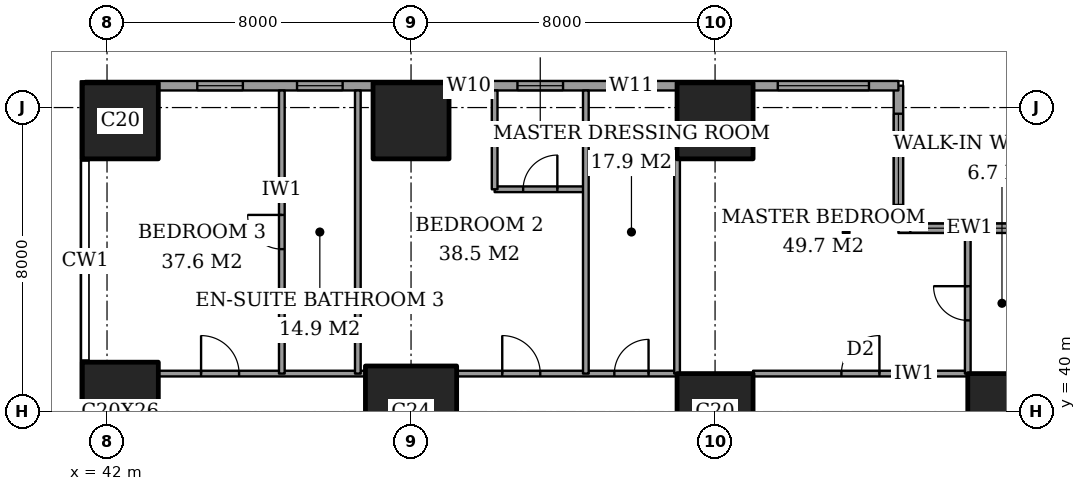
"""IFC4 building model, lengths in metres.
Left out: names, types, materials, properties, quantities, classifications, styles, units other than length and angle.
Written with IfcOpenShell. Run it as: python <this file> out.ifc"""

import sys

from ifc_helpers import new_model, si_unit, direction, frame, frame_2d, origin, origin_2d, place, context, subcontext, project, spatial, rectangle, extrude, element, fill, save


model = new_model("IFC4")
c1 = context("Model", 3, precision=1e-05, world=origin(), true_north=direction((0.0, 1.0)))
c2 = subcontext(c1, "Body", "Model", "MODEL_VIEW")
j1 = project(units=[si_unit("LENGTHUNIT", "METRE"), si_unit("PLANEANGLEUNIT", "RADIAN")], contexts=[c1])
p1 = place(None, origin())
s1 = spatial("IfcSite", under=j1, at=p1, CompositionType="ELEMENT")
p2 = place(p1, origin())
s2 = spatial("IfcBuilding", under=s1, at=p2, CompositionType="ELEMENT")
p3 = place(p2, frame((0.0, 0.0, 114.2)))
s3 = spatial("IfcBuildingStorey", under=s2, at=p3, CompositionType="ELEMENT", Elevation=114.2)
p4 = place(p3, frame((42.35, 40.0, 0.0), z_axis=(0.0, 0.0, 1.0), x_axis=(1.0, 0.0, 0.0)))
e1 = element("IfcColumn", 1, at=p4, inside=s3, PredefinedType="COLUMN", context=c2, shape_type="SweptSolid", body=[
    extrude(rectangle(XDim=2.0, YDim=2.6, at=origin_2d()), origin(), (0.0, 0.0, 1.0), 3.6),
])
p5 = place(p3, frame((42.35, 47.65, 0.0), z_axis=(0.0, 0.0, 1.0), x_axis=(1.0, 0.0, 0.0)))
e2 = element("IfcColumn", 2, at=p5, inside=s3, PredefinedType="COLUMN", context=c2, shape_type="SweptSolid", body=[
    extrude(rectangle(XDim=2.0, YDim=2.0, at=origin_2d()), origin(), (0.0, 0.0, 1.0), 3.6),
])
p6 = place(p3, frame((50.0, 40.0, 0.0), z_axis=(0.0, 0.0, 1.0), x_axis=(1.0, 0.0, 0.0)))
e3 = element("IfcColumn", 3, at=p6, inside=s3, PredefinedType="COLUMN", context=c2, shape_type="SweptSolid", body=[
    extrude(rectangle(XDim=2.4, YDim=2.4, at=origin_2d()), origin(), (0.0, 0.0, 1.0), 3.6),
])
for number, where, z_axis, x_axis in (
    (4, (50.0, 47.65, 0.0), (0.0, 0.0, 1.0), (1.0, 0.0, 0.0)),
    (5, (58.0, 40.0, 0.0), (0.0, 0.0, 1.0), (1.0, 0.0, 0.0)),
    (6, (58.0, 47.65, 0.0), (0.0, 0.0, 1.0), (1.0, 0.0, 0.0)),
    (7, (65.65, 40.0, 0.0), (0.0, 0.0, 1.0), (1.0, 0.0, 0.0)),
):
    element("IfcColumn", number, at=place(p3, frame(where, z_axis=z_axis, x_axis=x_axis)), inside=s3, PredefinedType="COLUMN", context=c2, shape_type="SweptSolid", body=[
        extrude(rectangle(XDim=2.0, YDim=2.0, at=origin_2d()), origin(), (0.0, 0.0, 1.0), 3.6),
    ])
p7 = place(p3, frame((66.575, 44.825, 0.0), z_axis=(0.0, 0.0, 1.0), x_axis=(-1.0, 0.0, 0.0)))
e8 = element("IfcWall", 8, at=p7, inside=s3, PredefinedType="SOLIDWALL", context=c2, shape_type="SweptSolid", body=[
    extrude(rectangle(XDim=3.75, YDim=0.25, at=frame_2d((1.875, 0.0))), origin(), (0.0, 0.0, 1.0), 3.6),
])
p8 = place(p7, frame((0.5, 0.0, 0.4)))
e9 = element("IfcOpeningElement", 9, at=p8, cuts=e8, PredefinedType="OPENING", context=c2, shape_type="SweptSolid", body=[
    extrude(rectangle(XDim=1.2, YDim=2.2, at=frame_2d((0.6, 1.1))), frame((0.0, 0.135, 0.0), z_axis=(0.0, -1.0, 0.0), x_axis=(1.0, 0.0, 0.0)), (0.0, 0.0, 1.0), 0.27),
])
p9 = place(p7, frame((2.238, 0.0, 0.4)))
e10 = element("IfcOpeningElement", 10, at=p9, cuts=e8, PredefinedType="OPENING", context=c2, shape_type="SweptSolid", body=[
    extrude(rectangle(XDim=1.2, YDim=2.2, at=frame_2d((0.6, 1.1))), frame((0.0, 0.135, 0.0), z_axis=(0.0, -1.0, 0.0), x_axis=(1.0, 0.0, 0.0)), (0.0, 0.0, 1.0), 0.27),
])
p10 = place(p3, frame((62.825, 44.825, 0.0), z_axis=(0.0, 0.0, 1.0), x_axis=(0.0, 1.0, 0.0)))
e11 = element("IfcWall", 11, at=p10, inside=s3, PredefinedType="SOLIDWALL", context=c2, shape_type="SweptSolid", body=[
    extrude(rectangle(XDim=3.75, YDim=0.25, at=frame_2d((1.875, 0.0))), origin(), (0.0, 0.0, 1.0), 3.6),
])
p11 = place(p10, frame((0.613, 0.0, 0.4)))
e12 = element("IfcOpeningElement", 12, at=p11, cuts=e11, PredefinedType="OPENING", context=c2, shape_type="SweptSolid", body=[
    extrude(rectangle(XDim=2.4, YDim=2.2, at=frame_2d((1.2, 1.1))), frame((0.0, 0.135, 0.0), z_axis=(0.0, -1.0, 0.0), x_axis=(1.0, 0.0, 0.0)), (0.0, 0.0, 1.0), 0.27),
])
p12 = place(p3, frame((62.825, 48.575, 0.0), z_axis=(0.0, 0.0, 1.0), x_axis=(-1.0, 0.0, 0.0)))
e13 = element("IfcWall", 13, at=p12, inside=s3, PredefinedType="SOLIDWALL", context=c2, shape_type="SweptSolid", body=[
    extrude(rectangle(XDim=21.4, YDim=0.25, at=frame_2d((10.7, 0.0))), origin(), (0.0, 0.0, 1.0), 3.6),
])
p13 = place(p12, frame((0.775, 0.0, 0.4)))
e14 = element("IfcOpeningElement", 14, at=p13, cuts=e13, PredefinedType="OPENING", context=c2, shape_type="SweptSolid", body=[
    extrude(rectangle(XDim=2.4, YDim=2.2, at=frame_2d((1.2, 1.1))), frame((0.0, 0.135, 0.0), z_axis=(0.0, -1.0, 0.0), x_axis=(1.0, 0.0, 0.0)), (0.0, 0.0, 1.0), 0.27),
])
p14 = place(p12, frame((6.425, 0.0, 0.4)))
e15 = element("IfcOpeningElement", 15, at=p14, cuts=e13, PredefinedType="OPENING", context=c2, shape_type="SweptSolid", body=[
    extrude(rectangle(XDim=1.2, YDim=2.2, at=frame_2d((0.6, 1.1))), frame((0.0, 0.135, 0.0), z_axis=(0.0, -1.0, 0.0), x_axis=(1.0, 0.0, 0.0)), (0.0, 0.0, 1.0), 0.27),
])
p15 = place(p12, frame((8.825, 0.0, 0.4)))
e16 = element("IfcOpeningElement", 16, at=p15, cuts=e13, PredefinedType="OPENING", context=c2, shape_type="SweptSolid", body=[
    extrude(rectangle(XDim=1.2, YDim=2.2, at=frame_2d((0.6, 1.1))), frame((0.0, 0.135, 0.0), z_axis=(0.0, -1.0, 0.0), x_axis=(1.0, 0.0, 0.0)), (0.0, 0.0, 1.0), 0.27),
])
p16 = place(p12, frame((11.0, 0.0, 0.4)))
e17 = element("IfcOpeningElement", 17, at=p16, cuts=e13, PredefinedType="OPENING", context=c2, shape_type="SweptSolid", body=[
    extrude(rectangle(XDim=0.6, YDim=2.2, at=frame_2d((0.3, 1.1))), frame((0.0, 0.135, 0.0), z_axis=(0.0, -1.0, 0.0), x_axis=(1.0, 0.0, 0.0)), (0.0, 0.0, 1.0), 0.27),
])
p17 = place(p12, frame((14.625, 0.0, 0.4)))
e18 = element("IfcOpeningElement", 18, at=p17, cuts=e13, PredefinedType="OPENING", context=c2, shape_type="SweptSolid", body=[
    extrude(rectangle(XDim=1.2, YDim=2.2, at=frame_2d((0.6, 1.1))), frame((0.0, 0.135, 0.0), z_axis=(0.0, -1.0, 0.0), x_axis=(1.0, 0.0, 0.0)), (0.0, 0.0, 1.0), 0.27),
])
p18 = place(p12, frame((17.25, 0.0, 0.4)))
e19 = element("IfcOpeningElement", 19, at=p18, cuts=e13, PredefinedType="OPENING", context=c2, shape_type="SweptSolid", body=[
    extrude(rectangle(XDim=1.2, YDim=2.2, at=frame_2d((0.6, 1.1))), frame((0.0, 0.135, 0.0), z_axis=(0.0, -1.0, 0.0), x_axis=(1.0, 0.0, 0.0)), (0.0, 0.0, 1.0), 0.27),
])
p19 = place(p3, frame((43.35, 41.0, 0.0), z_axis=(0.0, 0.0, 1.0), x_axis=(1.0, 0.0, 0.0)))
e20 = element("IfcWall", 20, at=p19, inside=s3, PredefinedType="PARTITIONING", context=c2, shape_type="SweptSolid", body=[
    extrude(rectangle(XDim=5.45, YDim=0.15, at=frame_2d((2.725, 0.0))), origin(), (0.0, 0.0, 1.0), 3.35),
])
p20 = place(p19, frame((1.125, 0.0, 0.0)))
e21 = element("IfcOpeningElement", 21, at=p20, cuts=e20, PredefinedType="OPENING", context=c2, shape_type="SweptSolid", body=[
    extrude(rectangle(XDim=1.0, YDim=2.1, at=frame_2d((0.5, 1.05))), frame((0.0, 0.085, 0.0), z_axis=(0.0, -1.0, 0.0), x_axis=(1.0, 0.0, 0.0)), (0.0, 0.0, 1.0), 0.17),
])
p21 = place(p3, frame((51.2, 41.0, 0.0), z_axis=(0.0, 0.0, 1.0), x_axis=(1.0, 0.0, 0.0)))
e22 = element("IfcWall", 22, at=p21, inside=s3, PredefinedType="PARTITIONING", context=c2, shape_type="SweptSolid", body=[
    extrude(rectangle(XDim=5.8, YDim=0.15, at=frame_2d((2.9, 0.0))), origin(), (0.0, 0.0, 1.0), 3.35),
])
p22 = place(p21, frame((4.15, 0.0, 0.0)))
e23 = element("IfcOpeningElement", 23, at=p22, cuts=e22, PredefinedType="OPENING", context=c2, shape_type="SweptSolid", body=[
    extrude(rectangle(XDim=0.9, YDim=2.1, at=frame_2d((0.45, 1.05))), frame((0.0, 0.085, 0.0), z_axis=(0.0, -1.0, 0.0), x_axis=(1.0, 0.0, 0.0)), (0.0, 0.0, 1.0), 0.17),
])
p23 = place(p21, frame((1.2, 0.0, 0.0)))
e24 = element("IfcOpeningElement", 24, at=p23, cuts=e22, PredefinedType="OPENING", context=c2, shape_type="SweptSolid", body=[
    extrude(rectangle(XDim=1.0, YDim=2.1, at=frame_2d((0.5, 1.05))), frame((0.0, 0.085, 0.0), z_axis=(0.0, -1.0, 0.0), x_axis=(1.0, 0.0, 0.0)), (0.0, 0.0, 1.0), 0.17),
])
p24 = place(p3, frame((59.0, 41.0, 0.0), z_axis=(0.0, 0.0, 1.0), x_axis=(1.0, 0.0, 0.0)))
e25 = element("IfcWall", 25, at=p24, inside=s3, PredefinedType="PARTITIONING", context=c2, shape_type="SweptSolid", body=[
    extrude(rectangle(XDim=5.65, YDim=0.15, at=frame_2d((2.825, 0.0))), origin(), (0.0, 0.0, 1.0), 3.35),
])
p25 = place(p24, frame((2.325, 0.0, 0.0)))
e26 = element("IfcOpeningElement", 26, at=p25, cuts=e25, PredefinedType="OPENING", context=c2, shape_type="SweptSolid", body=[
    extrude(rectangle(XDim=1.0, YDim=2.1, at=frame_2d((0.5, 1.05))), frame((0.0, 0.085, 0.0), z_axis=(0.0, -1.0, 0.0), x_axis=(1.0, 0.0, 0.0)), (0.0, 0.0, 1.0), 0.17),
])
p26 = place(p3, frame((52.2, 45.85, 0.0), z_axis=(0.0, 0.0, 1.0), x_axis=(1.0, 0.0, 0.0)))
e27 = element("IfcWall", 27, at=p26, inside=s3, PredefinedType="PARTITIONING", context=c2, shape_type="SweptSolid", body=[
    extrude(rectangle(XDim=2.4, YDim=0.15, at=frame_2d((1.2, 0.0))), origin(), (0.0, 0.0, 1.0), 3.35),
])
p27 = place(p26, frame((0.75, 0.0, 0.0)))
e28 = element("IfcOpeningElement", 28, at=p27, cuts=e27, PredefinedType="OPENING", context=c2, shape_type="SweptSolid", body=[
    extrude(rectangle(XDim=0.9, YDim=2.1, at=frame_2d((0.45, 1.05))), frame((0.0, 0.085, 0.0), z_axis=(0.0, -1.0, 0.0), x_axis=(1.0, 0.0, 0.0)), (0.0, 0.0, 1.0), 0.17),
])
p28 = place(p3, frame((46.6, 41.0, 0.0), z_axis=(0.0, 0.0, 1.0), x_axis=(0.0, 1.0, 0.0)))
e29 = element("IfcWall", 29, at=p28, inside=s3, PredefinedType="PARTITIONING", context=c2, shape_type="SweptSolid", body=[
    extrude(rectangle(XDim=7.45, YDim=0.15, at=frame_2d((3.725, 0.0))), origin(), (0.0, 0.0, 1.0), 3.35),
])
p29 = place(p28, frame((3.275, 0.0, 0.0)))
e30 = element("IfcOpeningElement", 30, at=p29, cuts=e29, PredefinedType="OPENING", context=c2, shape_type="SweptSolid", body=[
    extrude(rectangle(XDim=0.9, YDim=2.1, at=frame_2d((0.45, 1.05))), frame((0.0, 0.085, 0.0), z_axis=(0.0, -1.0, 0.0), x_axis=(1.0, 0.0, 0.0)), (0.0, 0.0, 1.0), 0.17),
])
p30 = place(p3, frame((48.6, 41.0, 0.0), z_axis=(0.0, 0.0, 1.0), x_axis=(0.0, 1.0, 0.0)))
e31 = element("IfcWall", 31, at=p30, inside=s3, PredefinedType="PARTITIONING", context=c2, shape_type="SweptSolid", body=[
    extrude(rectangle(XDim=7.45, YDim=0.15, at=frame_2d((3.725, 0.0))), origin(), (0.0, 0.0, 1.0), 3.35),
])
p31 = place(p3, frame((52.2, 45.85, 0.0), z_axis=(0.0, 0.0, 1.0), x_axis=(0.0, 1.0, 0.0)))
e32 = element("IfcWall", 32, at=p31, inside=s3, PredefinedType="PARTITIONING", context=c2, shape_type="SweptSolid", body=[
    extrude(rectangle(XDim=2.6, YDim=0.15, at=frame_2d((1.3, 0.0))), origin(), (0.0, 0.0, 1.0), 3.35),
])
p32 = place(p3, frame((54.6, 41.0, 0.0), z_axis=(0.0, 0.0, 1.0), x_axis=(0.0, 1.0, 0.0)))
e33 = element("IfcWall", 33, at=p32, inside=s3, PredefinedType="PARTITIONING", context=c2, shape_type="SweptSolid", body=[
    extrude(rectangle(XDim=7.45, YDim=0.15, at=frame_2d((3.725, 0.0))), origin(), (0.0, 0.0, 1.0), 3.35),
])
p33 = place(p3, frame((57.0, 41.0, 0.0), z_axis=(0.0, 0.0, 1.0), x_axis=(0.0, 1.0, 0.0)))
e34 = element("IfcWall", 34, at=p33, inside=s3, PredefinedType="PARTITIONING", context=c2, shape_type="SweptSolid", body=[
    extrude(rectangle(XDim=5.65, YDim=0.15, at=frame_2d((2.825, 0.0))), origin(), (0.0, 0.0, 1.0), 3.35),
])
p34 = place(p3, frame((64.65, 41.0, 0.0), z_axis=(0.0, 0.0, 1.0), x_axis=(0.0, 1.0, 0.0)))
e35 = element("IfcWall", 35, at=p34, inside=s3, PredefinedType="PARTITIONING", context=c2, shape_type="SweptSolid", body=[
    extrude(rectangle(XDim=3.7, YDim=0.15, at=frame_2d((1.85, 0.0))), origin(), (0.0, 0.0, 1.0), 3.35),
])
p35 = place(p34, frame((1.4, 0.0, 0.0)))
e36 = element("IfcOpeningElement", 36, at=p35, cuts=e35, PredefinedType="OPENING", context=c2, shape_type="SweptSolid", body=[
    extrude(rectangle(XDim=0.9, YDim=2.1, at=frame_2d((0.45, 1.05))), frame((0.0, 0.085, 0.0), z_axis=(0.0, -1.0, 0.0), x_axis=(1.0, 0.0, 0.0)), (0.0, 0.0, 1.0), 0.17),
])
p36 = place(p8, origin())
e37 = element("IfcWindow", 37, at=p36, inside=s3, PartitioningType="SINGLE_PANEL", PredefinedType="WINDOW", context=c2, shape_type="SweptSolid", body=[
    extrude(rectangle(XDim=1.2, YDim=2.2, at=frame_2d((0.6, 1.1))), frame((0.0, 0.03, 0.0), z_axis=(0.0, -1.0, 0.0), x_axis=(1.0, 0.0, 0.0)), (0.0, 0.0, 1.0), 0.06),
])
fill(e9, e37)
p37 = place(p9, origin())
e38 = element("IfcWindow", 38, at=p37, inside=s3, PartitioningType="SINGLE_PANEL", PredefinedType="WINDOW", context=c2, shape_type="SweptSolid", body=[
    extrude(rectangle(XDim=1.2, YDim=2.2, at=frame_2d((0.6, 1.1))), frame((0.0, 0.03, 0.0), z_axis=(0.0, -1.0, 0.0), x_axis=(1.0, 0.0, 0.0)), (0.0, 0.0, 1.0), 0.06),
])
fill(e10, e38)
p38 = place(p11, origin())
e39 = element("IfcWindow", 39, at=p38, inside=s3, PartitioningType="SINGLE_PANEL", PredefinedType="WINDOW", context=c2, shape_type="SweptSolid", body=[
    extrude(rectangle(XDim=2.4, YDim=2.2, at=frame_2d((1.2, 1.1))), frame((0.0, 0.03, 0.0), z_axis=(0.0, -1.0, 0.0), x_axis=(1.0, 0.0, 0.0)), (0.0, 0.0, 1.0), 0.06),
])
fill(e12, e39)
p39 = place(p13, origin())
e40 = element("IfcWindow", 40, at=p39, inside=s3, PartitioningType="SINGLE_PANEL", PredefinedType="WINDOW", context=c2, shape_type="SweptSolid", body=[
    extrude(rectangle(XDim=2.4, YDim=2.2, at=frame_2d((1.2, 1.1))), frame((0.0, 0.03, 0.0), z_axis=(0.0, -1.0, 0.0), x_axis=(1.0, 0.0, 0.0)), (0.0, 0.0, 1.0), 0.06),
])
fill(e14, e40)
p40 = place(p14, origin())
e41 = element("IfcWindow", 41, at=p40, inside=s3, PartitioningType="SINGLE_PANEL", PredefinedType="WINDOW", context=c2, shape_type="SweptSolid", body=[
    extrude(rectangle(XDim=1.2, YDim=2.2, at=frame_2d((0.6, 1.1))), frame((0.0, 0.03, 0.0), z_axis=(0.0, -1.0, 0.0), x_axis=(1.0, 0.0, 0.0)), (0.0, 0.0, 1.0), 0.06),
])
fill(e15, e41)
p41 = place(p15, origin())
e42 = element("IfcWindow", 42, at=p41, inside=s3, PartitioningType="SINGLE_PANEL", PredefinedType="WINDOW", context=c2, shape_type="SweptSolid", body=[
    extrude(rectangle(XDim=1.2, YDim=2.2, at=frame_2d((0.6, 1.1))), frame((0.0, 0.03, 0.0), z_axis=(0.0, -1.0, 0.0), x_axis=(1.0, 0.0, 0.0)), (0.0, 0.0, 1.0), 0.06),
])
fill(e16, e42)
p42 = place(p16, origin())
e43 = element("IfcWindow", 43, at=p42, inside=s3, PartitioningType="SINGLE_PANEL", PredefinedType="WINDOW", context=c2, shape_type="SweptSolid", body=[
    extrude(rectangle(XDim=0.6, YDim=2.2, at=frame_2d((0.3, 1.1))), frame((0.0, 0.03, 0.0), z_axis=(0.0, -1.0, 0.0), x_axis=(1.0, 0.0, 0.0)), (0.0, 0.0, 1.0), 0.06),
])
fill(e17, e43)
p43 = place(p17, origin())
e44 = element("IfcWindow", 44, at=p43, inside=s3, PartitioningType="SINGLE_PANEL", PredefinedType="WINDOW", context=c2, shape_type="SweptSolid", body=[
    extrude(rectangle(XDim=1.2, YDim=2.2, at=frame_2d((0.6, 1.1))), frame((0.0, 0.03, 0.0), z_axis=(0.0, -1.0, 0.0), x_axis=(1.0, 0.0, 0.0)), (0.0, 0.0, 1.0), 0.06),
])
fill(e18, e44)
p44 = place(p18, origin())
e45 = element("IfcWindow", 45, at=p44, inside=s3, PartitioningType="SINGLE_PANEL", PredefinedType="WINDOW", context=c2, shape_type="SweptSolid", body=[
    extrude(rectangle(XDim=1.2, YDim=2.2, at=frame_2d((0.6, 1.1))), frame((0.0, 0.03, 0.0), z_axis=(0.0, -1.0, 0.0), x_axis=(1.0, 0.0, 0.0)), (0.0, 0.0, 1.0), 0.06),
])
fill(e19, e45)
p45 = place(p35, origin())
e46 = element("IfcDoor", 46, at=p45, inside=s3, OperationType="SINGLE_SWING_LEFT", PredefinedType="DOOR", context=c2, shape_type="SweptSolid", body=[
    extrude(rectangle(XDim=0.9, YDim=2.1, at=frame_2d((0.45, 1.05))), frame((0.0, 0.025, 0.0), z_axis=(0.0, -1.0, 0.0), x_axis=(1.0, 0.0, 0.0)), (0.0, 0.0, 1.0), 0.05),
])
fill(e36, e46)
p46 = place(p25, origin())
e47 = element("IfcDoor", 47, at=p46, inside=s3, OperationType="SINGLE_SWING_LEFT", PredefinedType="DOOR", context=c2, shape_type="SweptSolid", body=[
    extrude(rectangle(XDim=1.0, YDim=2.1, at=frame_2d((0.5, 1.05))), frame((0.0, 0.025, 0.0), z_axis=(0.0, -1.0, 0.0), x_axis=(1.0, 0.0, 0.0)), (0.0, 0.0, 1.0), 0.05),
])
fill(e26, e47)
p47 = place(p22, origin())
e48 = element("IfcDoor", 48, at=p47, inside=s3, OperationType="SINGLE_SWING_LEFT", PredefinedType="DOOR", context=c2, shape_type="SweptSolid", body=[
    extrude(rectangle(XDim=0.9, YDim=2.1, at=frame_2d((0.45, 1.05))), frame((0.0, 0.025, 0.0), z_axis=(0.0, -1.0, 0.0), x_axis=(1.0, 0.0, 0.0)), (0.0, 0.0, 1.0), 0.05),
])
fill(e23, e48)
p48 = place(p27, origin())
e49 = element("IfcDoor", 49, at=p48, inside=s3, OperationType="SINGLE_SWING_LEFT", PredefinedType="DOOR", context=c2, shape_type="SweptSolid", body=[
    extrude(rectangle(XDim=0.9, YDim=2.1, at=frame_2d((0.45, 1.05))), frame((0.0, 0.025, 0.0), z_axis=(0.0, -1.0, 0.0), x_axis=(1.0, 0.0, 0.0)), (0.0, 0.0, 1.0), 0.05),
])
fill(e28, e49)
p49 = place(p23, origin())
e50 = element("IfcDoor", 50, at=p49, inside=s3, OperationType="SINGLE_SWING_RIGHT", PredefinedType="DOOR", context=c2, shape_type="SweptSolid", body=[
    extrude(rectangle(XDim=1.0, YDim=2.1, at=frame_2d((0.5, 1.05))), frame((0.0, 0.025, 0.0), z_axis=(0.0, -1.0, 0.0), x_axis=(1.0, 0.0, 0.0)), (0.0, 0.0, 1.0), 0.05),
])
fill(e24, e50)
p50 = place(p29, origin())
e51 = element("IfcDoor", 51, at=p50, inside=s3, OperationType="SINGLE_SWING_LEFT", PredefinedType="DOOR", context=c2, shape_type="SweptSolid", body=[
    extrude(rectangle(XDim=0.9, YDim=2.1, at=frame_2d((0.45, 1.05))), frame((0.0, 0.025, 0.0), z_axis=(0.0, -1.0, 0.0), x_axis=(1.0, 0.0, 0.0)), (0.0, 0.0, 1.0), 0.05),
])
fill(e30, e51)
p51 = place(p20, origin())
e52 = element("IfcDoor", 52, at=p51, inside=s3, OperationType="SINGLE_SWING_RIGHT", PredefinedType="DOOR", context=c2, shape_type="SweptSolid", body=[
    extrude(rectangle(XDim=1.0, YDim=2.1, at=frame_2d((0.5, 1.05))), frame((0.0, 0.025, 0.0), z_axis=(0.0, -1.0, 0.0), x_axis=(1.0, 0.0, 0.0)), (0.0, 0.0, 1.0), 0.05),
])
fill(e21, e52)
save(model, sys.argv[1])
